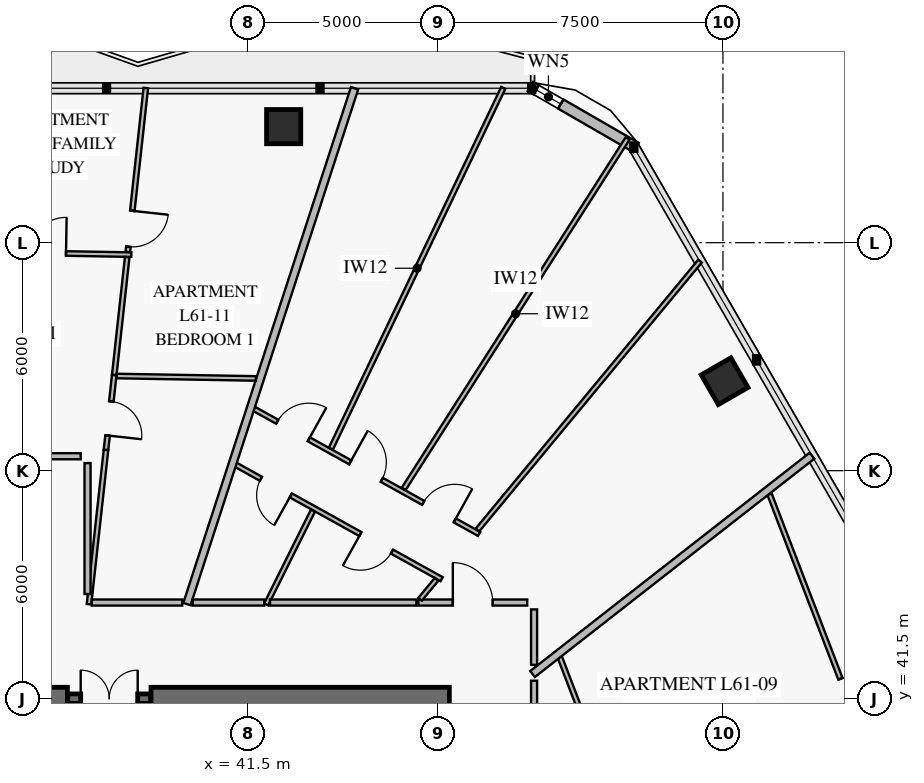
"""IFC4 building model, lengths in metres.
Left out: names, types, materials, properties, quantities, classifications, styles, units other than length and angle.
Written with IfcOpenShell. Run it as: python <this file> out.ifc"""

import sys

from ifc_helpers import new_model, si_unit, direction, frame, frame_2d, origin, origin_2d, place, context, subcontext, project, spatial, rectangle, extrude, element, fill, save


model = new_model("IFC4")
c1 = context("Model", 3, precision=1e-05, world=origin(), true_north=direction((0.0, 1.0)))
c2 = subcontext(c1, "Body", "Model", "MODEL_VIEW")
j1 = project(units=[si_unit("LENGTHUNIT", "METRE"), si_unit("PLANEANGLEUNIT", "RADIAN")], contexts=[c1])
p1 = place(None, origin())
s1 = spatial("IfcSite", under=j1, at=p1, CompositionType="ELEMENT")
p2 = place(p1, origin())
s2 = spatial("IfcBuilding", under=s1, at=p2, CompositionType="ELEMENT")
p3 = place(p2, frame((0.0, 0.0, 242.6)))
s3 = spatial("IfcBuildingStorey", under=s2, at=p3, CompositionType="ELEMENT", Elevation=242.6)
p4 = place(p3, frame((46.8, 41.5, 0.0), z_axis=(0.0, 0.0, 1.0), x_axis=(-1.0, 0.0, 0.0)))
e1 = element("IfcWall", 1, at=p4, inside=s3, PredefinedType="SHEAR", context=c2, shape_type="SweptSolid", body=[
    extrude(rectangle(XDim=7.85, YDim=0.6, at=frame_2d((3.925, 0.0))), origin(), (0.0, 0.0, 1.0), 3.8),
])
p5 = place(p3, frame((36.75, 41.5, 0.0), z_axis=(0.0, 0.0, 1.0), x_axis=(-1.0, 0.0, 0.0)))
e2 = element("IfcWall", 2, at=p5, inside=s3, PredefinedType="SHEAR", context=c2, shape_type="SweptSolid", body=[
    extrude(rectangle(XDim=11.55, YDim=0.6, at=frame_2d((5.775, 0.0))), origin(), (0.0, 0.0, 1.0), 3.8),
])
p6 = place(p5, frame((4.25, 0.0, 0.0)))
e3 = element("IfcOpeningElement", 3, at=p6, cuts=e2, PredefinedType="OPENING", context=c2, shape_type="SweptSolid", body=[
    extrude(rectangle(XDim=1.1, YDim=2.15, at=frame_2d((0.55, 1.075))), frame((0.0, 0.312, 0.0), z_axis=(0.0, -1.0, 0.0), x_axis=(1.0, 0.0, 0.0)), (0.0, 0.0, 1.0), 0.624),
])
for number, where, z_axis, x_axis in (
    (4, (54.044, 49.855, 0.0), (0.0, 0.0, 1.0), (-0.5, 0.866, 0.0)),
    (5, (42.441, 56.554, 0.0), (0.0, 0.0, 1.0), (-1.0, 0.0, 0.0)),
):
    element("IfcColumn", number, at=place(p3, frame(where, z_axis=z_axis, x_axis=x_axis)), inside=s3, PredefinedType="COLUMN", context=c2, shape_type="SweptSolid", body=[
        extrude(rectangle(XDim=0.9, YDim=0.9, at=origin_2d()), origin(), (0.0, 0.0, 1.0), 3.55),
    ])
p7 = place(p3, frame((48.93, 57.611, 0.0), z_axis=(0.0, 0.0, 1.0), x_axis=(0.866028773314, -0.499994163758, 0.0)))
e6 = element("IfcWall", 6, at=p7, inside=s3, PredefinedType="SOLIDWALL", context=c2, shape_type="SweptSolid", body=[
    extrude(rectangle(XDim=3.215, YDim=0.28, at=frame_2d((1.607, 0.0))), origin(), (0.0, 0.0, 1.0), 3.55),
])
p8 = place(p7, frame((0.176, 0.0, 0.85)))
e7 = element("IfcOpeningElement", 7, at=p8, cuts=e6, PredefinedType="OPENING", context=c2, shape_type="SweptSolid", body=[
    extrude(rectangle(XDim=0.75, YDim=1.5, at=frame_2d((0.375, 0.75))), frame((0.0, 0.152, 0.0), z_axis=(0.0, -1.0, 0.0), x_axis=(1.0, 0.0, 0.0)), (0.0, 0.0, 1.0), 0.304),
])
p9 = place(p3, frame((36.76, 41.5, 0.0), z_axis=(0.0, 0.0, 1.0), x_axis=(1.0, 0.0, 0.0)))
e8 = element("IfcWall", 8, at=p9, inside=s3, PredefinedType="SOLIDWALL", context=c2, shape_type="SweptSolid", body=[
    extrude(rectangle(XDim=2.18, YDim=0.25, at=frame_2d((1.09, 0.0))), origin(), (0.0, 0.0, 1.0), 3.8),
])
p10 = place(p9, frame((0.34, 0.0, 0.0)))
e9 = element("IfcOpeningElement", 9, at=p10, cuts=e8, PredefinedType="OPENING", context=c2, shape_type="SweptSolid", body=[
    extrude(rectangle(XDim=1.5, YDim=2.15, at=frame_2d((0.75, 1.075))), frame((0.0, 0.137, 0.0), z_axis=(0.0, -1.0, 0.0), x_axis=(1.0, 0.0, 0.0)), (0.0, 0.0, 1.0), 0.274),
])
p11 = place(p3, frame((58.289, 38.903, 0.0), z_axis=(0.0, 0.0, 1.0), x_axis=(-0.358377768056, 0.933576657465, 0.0)))
e10 = element("IfcWall", 10, at=p11, inside=s3, PredefinedType="PARTITIONING", context=c2, shape_type="SweptSolid", body=[
    extrude(rectangle(XDim=8.544, YDim=0.12, at=frame_2d((4.272, 0.0))), origin(), (0.0, 0.0, 1.0), 3.55),
])
p12 = place(p11, frame((2.393, 0.0, 0.0)))
e11 = element("IfcOpeningElement", 11, at=p12, cuts=e10, PredefinedType="OPENING", context=c2, shape_type="SweptSolid", body=[
    extrude(rectangle(XDim=0.95, YDim=2.1, at=frame_2d((0.475, 1.05))), frame((0.0, 0.072, 0.0), z_axis=(0.0, -1.0, 0.0), x_axis=(1.0, 0.0, 0.0)), (0.0, 0.0, 1.0), 0.144),
])
p13 = place(p3, frame((46.597, 44.644, 0.0), z_axis=(0.0, 0.0, 1.0), x_axis=(-0.874105625874, 0.48573588998, 0.0)))
e12 = element("IfcWall", 12, at=p13, inside=s3, PredefinedType="PARTITIONING", context=c2, shape_type="SweptSolid", body=[
    extrude(rectangle(XDim=6.244, YDim=0.12, at=frame_2d((3.122, 0.0))), origin(), (0.0, 0.0, 1.0), 3.55),
])
p14 = place(p13, frame((1.495, 0.0, 0.0)))
e13 = element("IfcOpeningElement", 13, at=p14, cuts=e12, PredefinedType="OPENING", context=c2, shape_type="SweptSolid", body=[
    extrude(rectangle(XDim=0.95, YDim=2.1, at=frame_2d((0.475, 1.05))), frame((0.0, 0.072, 0.0), z_axis=(0.0, -1.0, 0.0), x_axis=(1.0, 0.0, 0.0)), (0.0, 0.0, 1.0), 0.144),
])
p15 = place(p13, frame((4.54, 0.0, 0.0)))
e14 = element("IfcOpeningElement", 14, at=p15, cuts=e12, PredefinedType="OPENING", context=c2, shape_type="SweptSolid", body=[
    extrude(rectangle(XDim=0.9, YDim=2.1, at=frame_2d((0.45, 1.05))), frame((0.0, 0.072, 0.0), z_axis=(0.0, -1.0, 0.0), x_axis=(1.0, 0.0, 0.0)), (0.0, 0.0, 1.0), 0.144),
])
p16 = place(p3, frame((47.583, 45.835, 0.0), z_axis=(0.0, 0.0, 1.0), x_axis=(-0.874098085508, 0.485749458993, 0.0)))
e15 = element("IfcWall", 15, at=p16, inside=s3, PredefinedType="PARTITIONING", context=c2, shape_type="SweptSolid", body=[
    extrude(rectangle(XDim=6.81, YDim=0.12, at=frame_2d((3.405, 0.0))), origin(), (0.0, 0.0, 1.0), 3.55),
])
p17 = place(p16, frame((0.732, 0.0, 0.0)))
e16 = element("IfcOpeningElement", 16, at=p17, cuts=e15, PredefinedType="OPENING", context=c2, shape_type="SweptSolid", body=[
    extrude(rectangle(XDim=0.95, YDim=2.1, at=frame_2d((0.475, 1.05))), frame((0.0, 0.072, 0.0), z_axis=(0.0, -1.0, 0.0), x_axis=(1.0, 0.0, 0.0)), (0.0, 0.0, 1.0), 0.144),
])
p18 = place(p16, frame((2.93, 0.0, 0.0)))
e17 = element("IfcOpeningElement", 17, at=p18, cuts=e15, PredefinedType="OPENING", context=c2, shape_type="SweptSolid", body=[
    extrude(rectangle(XDim=0.95, YDim=2.1, at=frame_2d((0.475, 1.05))), frame((0.0, 0.072, 0.0), z_axis=(0.0, -1.0, 0.0), x_axis=(1.0, 0.0, 0.0)), (0.0, 0.0, 1.0), 0.144),
])
p19 = place(p16, frame((5.128, 0.0, 0.0)))
e18 = element("IfcOpeningElement", 18, at=p19, cuts=e15, PredefinedType="OPENING", context=c2, shape_type="SweptSolid", body=[
    extrude(rectangle(XDim=0.95, YDim=2.1, at=frame_2d((0.475, 1.05))), frame((0.0, 0.072, 0.0), z_axis=(0.0, -1.0, 0.0), x_axis=(1.0, 0.0, 0.0)), (0.0, 0.0, 1.0), 0.144),
])
p20 = place(p3, frame((48.849, 44.03, 0.0), z_axis=(0.0, 0.0, 1.0), x_axis=(-1.0, 0.0, 0.0)))
e19 = element("IfcWall", 19, at=p20, inside=s3, PredefinedType="PARTITIONING", context=c2, shape_type="SweptSolid", body=[
    extrude(rectangle(XDim=2.864, YDim=0.16, at=frame_2d((1.432, 0.0))), origin(), (0.0, 0.0, 1.0), 2.95),
])
p21 = place(p20, frame((0.907, 0.0, 0.0)))
e20 = element("IfcOpeningElement", 20, at=p21, cuts=e19, PredefinedType="OPENING", context=c2, shape_type="SweptSolid", body=[
    extrude(rectangle(XDim=1.05, YDim=2.15, at=frame_2d((0.525, 1.075))), frame((0.0, 0.092, 0.0), z_axis=(0.0, -1.0, 0.0), x_axis=(1.0, 0.0, 0.0)), (0.0, 0.0, 1.0), 0.184),
])
p22 = place(p3, frame((38.432, 53.185, 0.0), z_axis=(0.0, 0.0, 1.0), x_axis=(-0.999847834671, 0.017444411801, 0.0)))
e21 = element("IfcWall", 21, at=p22, inside=s3, PredefinedType="PARTITIONING", context=c2, shape_type="SweptSolid", body=[
    extrude(rectangle(XDim=8.453, YDim=0.12, at=frame_2d((4.227, 0.0))), origin(), (0.0, 0.0, 1.0), 2.95),
])
p23 = place(p22, frame((1.719, 0.0, 0.0)))
e22 = element("IfcOpeningElement", 22, at=p23, cuts=e21, PredefinedType="OPENING", context=c2, shape_type="SweptSolid", body=[
    extrude(rectangle(XDim=0.95, YDim=2.1, at=frame_2d((0.475, 1.05))), frame((0.0, 0.072, 0.0), z_axis=(0.0, -1.0, 0.0), x_axis=(1.0, 0.0, 0.0)), (0.0, 0.0, 1.0), 0.144),
])
p24 = place(p22, frame((5.705, 0.0, 0.0)))
e23 = element("IfcOpeningElement", 23, at=p24, cuts=e21, PredefinedType="OPENING", context=c2, shape_type="SweptSolid", body=[
    extrude(rectangle(XDim=0.95, YDim=2.1, at=frame_2d((0.475, 1.05))), frame((0.0, 0.072, 0.0), z_axis=(0.0, -1.0, 0.0), x_axis=(1.0, 0.0, 0.0)), (0.0, 0.0, 1.0), 0.144),
])
p25 = place(p3, frame((37.766, 48.045, 0.0), z_axis=(0.0, 0.0, 1.0), x_axis=(0.109378163954, 0.994000209884, 0.0)))
e24 = element("IfcWall", 24, at=p25, inside=s3, PredefinedType="PARTITIONING", context=c2, shape_type="SweptSolid", body=[
    extrude(rectangle(XDim=1.984, YDim=0.12, at=frame_2d((0.992, 0.0))), origin(), (0.0, 0.0, 1.0), 3.15),
])
p26 = place(p25, frame((0.383, 0.0, 0.0)))
e25 = element("IfcOpeningElement", 25, at=p26, cuts=e24, PredefinedType="OPENING", context=c2, shape_type="SweptSolid", body=[
    extrude(rectangle(XDim=0.9, YDim=2.1, at=frame_2d((0.45, 1.05))), frame((0.0, 0.072, 0.0), z_axis=(0.0, -1.0, 0.0), x_axis=(1.0, 0.0, 0.0)), (0.0, 0.0, 1.0), 0.144),
])
p27 = place(p3, frame((37.983, 50.017, 0.0), z_axis=(0.0, 0.0, 1.0), x_axis=(0.109366759617, 0.994001464733, 0.0)))
e26 = element("IfcWall", 26, at=p27, inside=s3, PredefinedType="PARTITIONING", context=c2, shape_type="SweptSolid", body=[
    extrude(rectangle(XDim=3.121, YDim=0.12, at=frame_2d((1.561, 0.0))), origin(), (0.0, 0.0, 1.0), 3.55),
])
p28 = place(p3, frame((38.339, 53.255, 0.0), z_axis=(0.0, 0.0, 1.0), x_axis=(0.109363268669, 0.994001848824, 0.0)))
e27 = element("IfcWall", 27, at=p28, inside=s3, PredefinedType="PARTITIONING", context=c2, shape_type="SweptSolid", body=[
    extrude(rectangle(XDim=4.34, YDim=0.12, at=frame_2d((2.17, 0.0))), origin(), (0.0, 0.0, 1.0), 2.93),
])
p29 = place(p28, frame((0.14, 0.0, 0.0)))
e28 = element("IfcOpeningElement", 28, at=p29, cuts=e27, PredefinedType="OPENING", context=c2, shape_type="SweptSolid", body=[
    extrude(rectangle(XDim=0.95, YDim=2.1, at=frame_2d((0.475, 1.05))), frame((0.0, 0.072, 0.0), z_axis=(0.0, -1.0, 0.0), x_axis=(1.0, 0.0, 0.0)), (0.0, 0.0, 1.0), 0.144),
])
p30 = place(p3, frame((51.878, 36.938, 0.0), z_axis=(0.0, 0.0, 1.0), x_axis=(-0.358346020199, 0.933588844089, 0.0)))
e29 = element("IfcWall", 29, at=p30, inside=s3, PredefinedType="PARTITIONING", context=c2, shape_type="SweptSolid", body=[
    extrude(rectangle(XDim=6.1, YDim=0.12, at=frame_2d((3.05, 0.0))), origin(), (0.0, 0.0, 1.0), 3.55),
])
p31 = place(p3, frame((48.99, 42.149, 0.0), z_axis=(0.0, 0.0, 1.0), x_axis=(0.788003348051, 0.615670953887, 0.0)))
e30 = element("IfcWall", 30, at=p31, inside=s3, PredefinedType="PARTITIONING", context=c2, shape_type="SweptSolid", body=[
    extrude(rectangle(XDim=9.33, YDim=0.2, at=frame_2d((4.665, 0.0))), origin(), (0.0, 0.0, 1.0), 2.93),
])
p32 = place(p3, frame((41.98, 43.98, 0.0), z_axis=(0.0, 0.0, 1.0), x_axis=(0.446611639488, 0.894727915891, 0.0)))
e31 = element("IfcWall", 31, at=p32, inside=s3, PredefinedType="PARTITIONING", context=c2, shape_type="SweptSolid", body=[
    extrude(rectangle(XDim=2.758, YDim=0.12, at=frame_2d((1.379, 0.0))), origin(), (0.0, 0.0, 1.0), 3.55),
])
p33 = place(p3, frame((45.596, 47.017, 0.0), z_axis=(0.0, 0.0, 1.0), x_axis=(0.538471979817, 0.842643416252, 0.0)))
e32 = element("IfcWall", 32, at=p33, inside=s3, PredefinedType="PARTITIONING", context=c2, shape_type="SweptSolid", body=[
    extrude(rectangle(XDim=10.947, YDim=0.12, at=frame_2d((5.474, 0.0))), origin(), (0.0, 0.0, 1.0), 2.93),
])
p34 = place(p3, frame((43.684, 48.08, 0.0), z_axis=(0.0, 0.0, 1.0), x_axis=(0.431150039007, 0.902280246855, 0.0)))
e33 = element("IfcWall", 33, at=p34, inside=s3, PredefinedType="PARTITIONING", context=c2, shape_type="SweptSolid", body=[
    extrude(rectangle(XDim=10.521, YDim=0.12, at=frame_2d((5.261, 0.0))), origin(), (0.0, 0.0, 1.0), 2.93),
])
p35 = place(p3, frame((46.032, 44.118, 0.0), z_axis=(0.0, 0.0, 1.0), x_axis=(0.637773938941, 0.770223605719, 0.0)))
e34 = element("IfcWall", 34, at=p35, inside=s3, PredefinedType="PARTITIONING", context=c2, shape_type="SweptSolid", body=[
    extrude(rectangle(XDim=0.678, YDim=0.12, at=frame_2d((0.339, 0.0))), origin(), (0.0, 0.0, 1.0), 3.55),
])
p36 = place(p3, frame((47.539, 45.938, 0.0), z_axis=(0.0, 0.0, 1.0), x_axis=(0.637687358295, 0.770295289529, 0.0)))
e35 = element("IfcWall", 35, at=p36, inside=s3, PredefinedType="PARTITIONING", context=c2, shape_type="SweptSolid", body=[
    extrude(rectangle(XDim=9.187, YDim=0.12, at=frame_2d((4.594, 0.0))), origin(), (0.0, 0.0, 1.0), 2.93),
])
p37 = place(p3, frame((39.896, 43.99, 0.0), z_axis=(0.0, 0.0, 1.0), x_axis=(0.309018769513, 0.951055939516, 0.0)))
e36 = element("IfcWall", 36, at=p37, inside=s3, PredefinedType="PARTITIONING", context=c2, shape_type="SweptSolid", body=[
    extrude(rectangle(XDim=14.272, YDim=0.2, at=frame_2d((7.136, 0.0))), origin(), (0.0, 0.0, 1.0), 2.93),
])
p38 = place(p3, frame((37.319, 43.985, 0.0), z_axis=(0.0, 0.0, 1.0), x_axis=(0.109394817792, 0.993998377182, 0.0)))
e37 = element("IfcWall", 37, at=p38, inside=s3, PredefinedType="PARTITIONING", context=c2, shape_type="SweptSolid", body=[
    extrude(rectangle(XDim=4.084, YDim=0.12, at=frame_2d((2.042, 0.0))), origin(), (0.0, 0.0, 1.0), 3.55),
])
p39 = place(p3, frame((41.711, 49.927, 0.0), z_axis=(0.0, 0.0, 1.0), x_axis=(-0.999847573959, 0.017459348466, 0.0)))
e38 = element("IfcWall", 38, at=p39, inside=s3, PredefinedType="PARTITIONING", context=c2, shape_type="SweptSolid", body=[
    extrude(rectangle(XDim=3.664, YDim=0.12, at=frame_2d((1.832, 0.0))), origin(), (0.0, 0.0, 1.0), 2.95),
])
p40 = place(p3, frame((49.03, 36.065, 0.0), z_axis=(0.0, 0.0, 1.0), x_axis=(0.0, 1.0, 0.0)))
e39 = element("IfcWall", 39, at=p40, inside=s3, PredefinedType="PARTITIONING", context=c2, shape_type="SweptSolid", body=[
    extrude(rectangle(XDim=5.908, YDim=0.16, at=frame_2d((2.954, 0.0))), origin(), (0.0, 0.0, 1.0), 3.55),
])
p41 = place(p3, frame((49.03, 42.39, 0.0), z_axis=(0.0, 0.0, 1.0), x_axis=(0.0, 1.0, 0.0)))
e40 = element("IfcWall", 40, at=p41, inside=s3, PredefinedType="PARTITIONING", context=c2, shape_type="SweptSolid", body=[
    extrude(rectangle(XDim=1.459, YDim=0.16, at=frame_2d((0.729, 0.0))), origin(), (0.0, 0.0, 1.0), 3.55),
])
p42 = place(p3, frame((45.933, 44.03, 0.0), z_axis=(0.0, 0.0, 1.0), x_axis=(-1.0, 0.0, 0.0)))
e41 = element("IfcWall", 41, at=p42, inside=s3, PredefinedType="PARTITIONING", context=c2, shape_type="SweptSolid", body=[
    extrude(rectangle(XDim=3.852, YDim=0.16, at=frame_2d((1.926, 0.0))), origin(), (0.0, 0.0, 1.0), 3.55),
])
p43 = place(p3, frame((41.929, 44.03, 0.0), z_axis=(0.0, 0.0, 1.0), x_axis=(-1.0, 0.0, 0.0)))
e42 = element("IfcWall", 42, at=p43, inside=s3, PredefinedType="PARTITIONING", context=c2, shape_type="SweptSolid", body=[
    extrude(rectangle(XDim=1.882, YDim=0.16, at=frame_2d((0.941, 0.0))), origin(), (0.0, 0.0, 1.0), 3.55),
])
p44 = place(p3, frame((37.28, 44.253, 0.0), z_axis=(0.0, 0.0, 1.0), x_axis=(0.0, 1.0, 0.0)))
e43 = element("IfcWall", 43, at=p44, inside=s3, PredefinedType="PARTITIONING", context=c2, shape_type="SweptSolid", body=[
    extrude(rectangle(XDim=3.447, YDim=0.16, at=frame_2d((1.723, 0.0))), origin(), (0.0, 0.0, 1.0), 3.55),
])
p45 = place(p3, frame((37.1, 47.88, 0.0), z_axis=(0.0, 0.0, 1.0), x_axis=(-1.0, 0.0, 0.0)))
e44 = element("IfcWall", 44, at=p45, inside=s3, PredefinedType="PARTITIONING", context=c2, shape_type="SweptSolid", body=[
    extrude(rectangle(XDim=2.2, YDim=0.16, at=frame_2d((1.1, 0.0))), origin(), (0.0, 0.0, 1.0), 3.55),
])
p46 = place(p3, frame((39.772, 44.03, 0.0), z_axis=(0.0, 0.0, 1.0), x_axis=(-1.0, 0.0, 0.0)))
e45 = element("IfcWall", 45, at=p46, inside=s3, PredefinedType="PARTITIONING", context=c2, shape_type="SweptSolid", body=[
    extrude(rectangle(XDim=2.38, YDim=0.16, at=frame_2d((1.19, 0.0))), origin(), (0.0, 0.0, 1.0), 2.95),
])
p47 = place(p8, origin())
e46 = element("IfcWindow", 46, at=p47, inside=s3, PartitioningType="SINGLE_PANEL", PredefinedType="WINDOW", context=c2, shape_type="SweptSolid", body=[
    extrude(rectangle(XDim=0.75, YDim=1.5, at=frame_2d((0.375, 0.75))), frame((0.0, 0.03, 0.0), z_axis=(0.0, -1.0, 0.0), x_axis=(1.0, 0.0, 0.0)), (0.0, 0.0, 1.0), 0.06),
])
fill(e7, e46)
p48 = place(p10, origin())
e47 = element("IfcDoor", 47, at=p48, inside=s3, OperationType="DOUBLE_DOOR_SINGLE_SWING", PredefinedType="DOOR", context=c2, shape_type="SweptSolid", body=[
    extrude(rectangle(XDim=1.5, YDim=2.15, at=frame_2d((0.75, 1.075))), frame((0.0, 0.025, 0.0), z_axis=(0.0, -1.0, 0.0), x_axis=(1.0, 0.0, 0.0)), (0.0, 0.0, 1.0), 0.05),
])
fill(e9, e47)
p49 = place(p12, frame((0.95, 0.0, 0.0), z_axis=(0.0, 0.0, 1.0), x_axis=(-1.0, 0.0, 0.0)))
e48 = element("IfcDoor", 48, at=p49, inside=s3, OperationType="SINGLE_SWING_RIGHT", PredefinedType="DOOR", context=c2, shape_type="SweptSolid", body=[
    extrude(rectangle(XDim=0.95, YDim=2.1, at=frame_2d((0.475, 1.05))), frame((0.0, 0.025, 0.0), z_axis=(0.0, -1.0, 0.0), x_axis=(1.0, 0.0, 0.0)), (0.0, 0.0, 1.0), 0.05),
])
fill(e11, e48)
p50 = place(p14, origin())
e49 = element("IfcDoor", 49, at=p50, inside=s3, OperationType="SINGLE_SWING_RIGHT", PredefinedType="DOOR", context=c2, shape_type="SweptSolid", body=[
    extrude(rectangle(XDim=0.95, YDim=2.1, at=frame_2d((0.475, 1.05))), frame((0.0, 0.025, 0.0), z_axis=(0.0, -1.0, 0.0), x_axis=(1.0, 0.0, 0.0)), (0.0, 0.0, 1.0), 0.05),
])
fill(e13, e49)
p51 = place(p15, origin())
e50 = element("IfcDoor", 50, at=p51, inside=s3, OperationType="SINGLE_SWING_LEFT", PredefinedType="DOOR", context=c2, shape_type="SweptSolid", body=[
    extrude(rectangle(XDim=0.9, YDim=2.1, at=frame_2d((0.45, 1.05))), frame((0.0, 0.025, 0.0), z_axis=(0.0, -1.0, 0.0), x_axis=(1.0, 0.0, 0.0)), (0.0, 0.0, 1.0), 0.05),
])
fill(e14, e50)
p52 = place(p17, frame((0.95, 0.0, 0.0), z_axis=(0.0, 0.0, 1.0), x_axis=(-1.0, 0.0, 0.0)))
e51 = element("IfcDoor", 51, at=p52, inside=s3, OperationType="SINGLE_SWING_RIGHT", PredefinedType="DOOR", context=c2, shape_type="SweptSolid", body=[
    extrude(rectangle(XDim=0.95, YDim=2.1, at=frame_2d((0.475, 1.05))), frame((0.0, 0.025, 0.0), z_axis=(0.0, -1.0, 0.0), x_axis=(1.0, 0.0, 0.0)), (0.0, 0.0, 1.0), 0.05),
])
fill(e16, e51)
p53 = place(p18, frame((0.95, 0.0, 0.0), z_axis=(0.0, 0.0, 1.0), x_axis=(-1.0, 0.0, 0.0)))
e52 = element("IfcDoor", 52, at=p53, inside=s3, OperationType="SINGLE_SWING_LEFT", PredefinedType="DOOR", context=c2, shape_type="SweptSolid", body=[
    extrude(rectangle(XDim=0.95, YDim=2.1, at=frame_2d((0.475, 1.05))), frame((0.0, 0.025, 0.0), z_axis=(0.0, -1.0, 0.0), x_axis=(1.0, 0.0, 0.0)), (0.0, 0.0, 1.0), 0.05),
])
fill(e17, e52)
p54 = place(p19, frame((0.95, 0.0, 0.0), z_axis=(0.0, 0.0, 1.0), x_axis=(-1.0, 0.0, 0.0)))
e53 = element("IfcDoor", 53, at=p54, inside=s3, OperationType="SINGLE_SWING_RIGHT", PredefinedType="DOOR", context=c2, shape_type="SweptSolid", body=[
    extrude(rectangle(XDim=0.95, YDim=2.1, at=frame_2d((0.475, 1.05))), frame((0.0, 0.025, 0.0), z_axis=(0.0, -1.0, 0.0), x_axis=(1.0, 0.0, 0.0)), (0.0, 0.0, 1.0), 0.05),
])
fill(e18, e53)
p55 = place(p21, frame((1.05, 0.0, 0.0), z_axis=(0.0, 0.0, 1.0), x_axis=(-1.0, 0.0, 0.0)))
e54 = element("IfcDoor", 54, at=p55, inside=s3, OperationType="SINGLE_SWING_LEFT", PredefinedType="DOOR", context=c2, shape_type="SweptSolid", body=[
    extrude(rectangle(XDim=1.05, YDim=2.15, at=frame_2d((0.525, 1.075))), frame((0.0, 0.025, 0.0), z_axis=(0.0, -1.0, 0.0), x_axis=(1.0, 0.0, 0.0)), (0.0, 0.0, 1.0), 0.05),
])
fill(e20, e54)
p56 = place(p23, frame((0.95, 0.0, 0.0), z_axis=(0.0, 0.0, 1.0), x_axis=(-1.0, 0.0, 0.0)))
e55 = element("IfcDoor", 55, at=p56, inside=s3, OperationType="SINGLE_SWING_RIGHT", PredefinedType="DOOR", context=c2, shape_type="SweptSolid", body=[
    extrude(rectangle(XDim=0.95, YDim=2.1, at=frame_2d((0.475, 1.05))), frame((0.0, 0.025, 0.0), z_axis=(0.0, -1.0, 0.0), x_axis=(1.0, 0.0, 0.0)), (0.0, 0.0, 1.0), 0.05),
])
fill(e22, e55)
p57 = place(p26, frame((0.9, 0.0, 0.0), z_axis=(0.0, 0.0, 1.0), x_axis=(-1.0, 0.0, 0.0)))
e56 = element("IfcDoor", 56, at=p57, inside=s3, OperationType="SINGLE_SWING_RIGHT", PredefinedType="DOOR", context=c2, shape_type="SweptSolid", body=[
    extrude(rectangle(XDim=0.9, YDim=2.1, at=frame_2d((0.45, 1.05))), frame((0.0, 0.025, 0.0), z_axis=(0.0, -1.0, 0.0), x_axis=(1.0, 0.0, 0.0)), (0.0, 0.0, 1.0), 0.05),
])
fill(e25, e56)
p58 = place(p29, frame((0.95, 0.0, 0.0), z_axis=(0.0, 0.0, 1.0), x_axis=(-1.0, 0.0, 0.0)))
e57 = element("IfcDoor", 57, at=p58, inside=s3, OperationType="SINGLE_SWING_LEFT", PredefinedType="DOOR", context=c2, shape_type="SweptSolid", body=[
    extrude(rectangle(XDim=0.95, YDim=2.1, at=frame_2d((0.475, 1.05))), frame((0.0, 0.025, 0.0), z_axis=(0.0, -1.0, 0.0), x_axis=(1.0, 0.0, 0.0)), (0.0, 0.0, 1.0), 0.05),
])
fill(e28, e57)
save(model, sys.argv[1])
